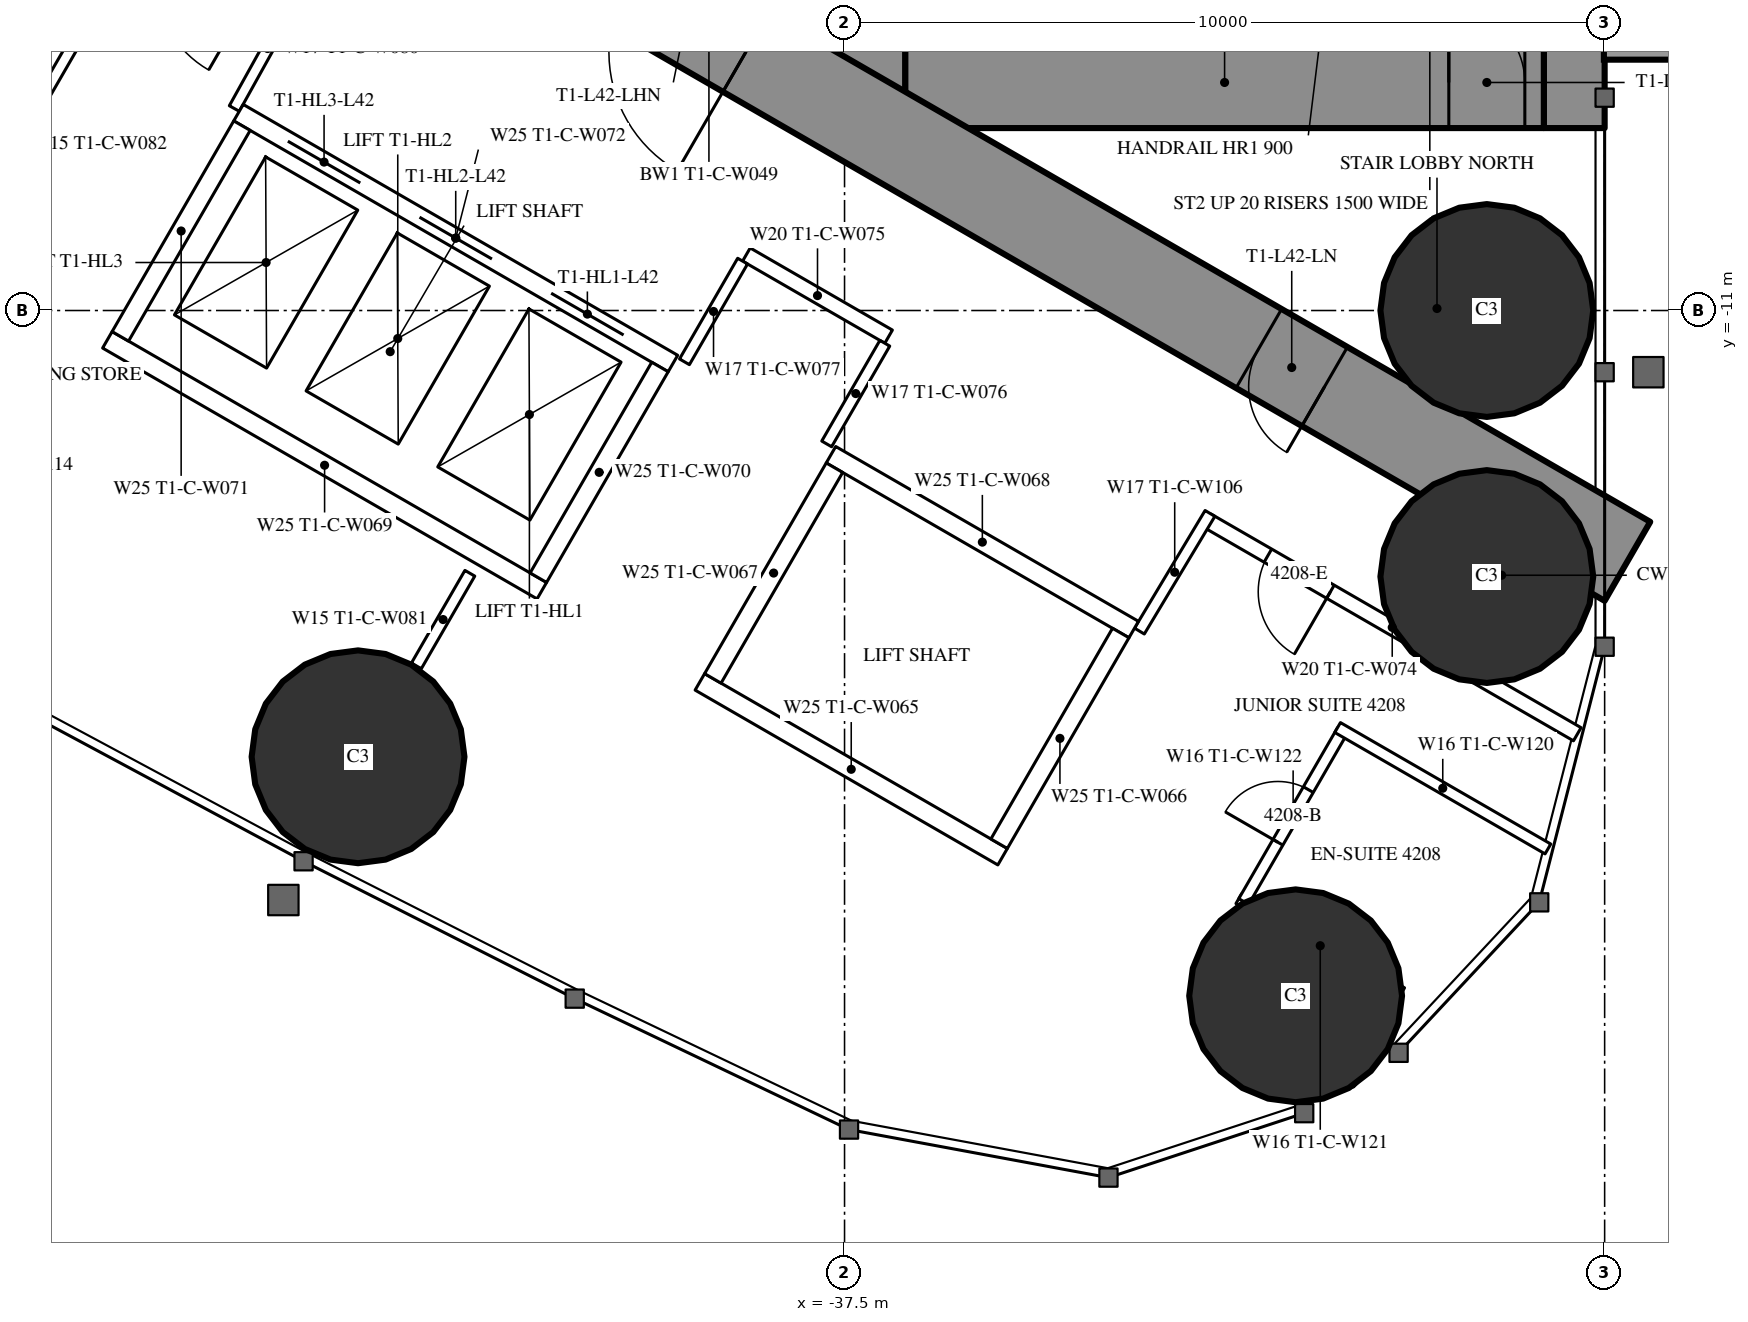
"""IFC4 building model, lengths in metres.
Left out: names, types, materials, properties, quantities, classifications, styles, units other than length and angle.
Written with IfcOpenShell. Run it as: python <this file> out.ifc"""

import sys

from ifc_helpers import new_model, si_unit, direction, frame, frame_2d, origin, origin_2d, place, context, subcontext, project, spatial, rectangle, circle, extrude, element, fill, save


model = new_model("IFC4")
c1 = context("Model", 3, precision=1e-05, world=origin(), true_north=direction((0.0, 1.0)))
c2 = subcontext(c1, "Body", "Model", "MODEL_VIEW")
j1 = project(units=[si_unit("LENGTHUNIT", "METRE"), si_unit("PLANEANGLEUNIT", "RADIAN")], contexts=[c1])
p1 = place(None, origin())
s1 = spatial("IfcSite", under=j1, at=p1, CompositionType="ELEMENT")
p2 = place(p1, origin())
s2 = spatial("IfcBuilding", under=s1, at=p2, CompositionType="ELEMENT")
p3 = place(p2, frame((0.0, 0.0, 159.8)))
s3 = spatial("IfcBuildingStorey", under=s2, at=p3, CompositionType="ELEMENT", Elevation=159.8)
for number, where, z_axis, x_axis in (
    (1, (-31.565, -20.016, 0.0), (0.0, 0.0, 1.0), (1.0, 0.0, 0.0)),
    (2, (-29.05, -11.0, 0.0), (0.0, 0.0, 1.0), (1.0, 0.0, 0.0)),
    (3, (-29.05, -14.5, 0.0), (0.0, 0.0, 1.0), (1.0, 0.0, 0.0)),
    (4, (-43.9, -16.871, 0.0), (0.0, 0.0, 1.0), (1.0, 0.0, 0.0)),
):
    element("IfcColumn", number, at=place(p3, frame(where, z_axis=z_axis, x_axis=x_axis)), inside=s3, PredefinedType="COLUMN", context=c2, shape_type="SweptSolid", body=[
        extrude(circle(Radius=1.4, at=origin_2d()), origin(), (0.0, 0.0, 1.0), 3.5),
    ])
p4 = place(p3, frame((-27.9, 8.6, 0.0), z_axis=(0.0, 0.0, 1.0), x_axis=(0.0, -1.0, 0.0)))
e5 = element("IfcWall", 5, at=p4, inside=s3, PredefinedType="SHEAR", context=c2, shape_type="SweptSolid", body=[
    extrude(rectangle(XDim=17.2, YDim=0.8, at=frame_2d((8.6, 0.0))), origin(), (0.0, 0.0, 1.0), 3.5),
])
p5 = place(p4, frame((2.45, 0.0, 0.6)))
e6 = element("IfcOpeningElement", 6, at=p5, cuts=e5, PredefinedType="OPENING", context=c2, shape_type="SweptSolid", body=[
    extrude(rectangle(XDim=0.6, YDim=2.1, at=frame_2d((0.3, 1.05))), frame((0.0, 0.41, 0.0), z_axis=(0.0, -1.0, 0.0), x_axis=(1.0, 0.0, 0.0)), (0.0, 0.0, 1.0), 0.82),
])
p6 = place(p4, frame((14.15, 0.0, 0.6)))
e7 = element("IfcOpeningElement", 7, at=p6, cuts=e5, PredefinedType="OPENING", context=c2, shape_type="SweptSolid", body=[
    extrude(rectangle(XDim=0.6, YDim=2.1, at=frame_2d((0.3, 1.05))), frame((0.0, 0.41, 0.0), z_axis=(0.0, -1.0, 0.0), x_axis=(1.0, 0.0, 0.0)), (0.0, 0.0, 1.0), 0.82),
])
p7 = place(p3, frame((-37.3, 8.6, 0.0), z_axis=(0.0, 0.0, 1.0), x_axis=(0.0, -1.0, 0.0)))
e8 = element("IfcWall", 8, at=p7, inside=s3, PredefinedType="SHEAR", context=c2, shape_type="SweptSolid", body=[
    extrude(rectangle(XDim=17.2, YDim=1.2, at=frame_2d((8.6, 0.0))), origin(), (0.0, 0.0, 1.0), 3.5),
])
p8 = place(p7, frame((7.7, 0.0, 0.0)))
e9 = element("IfcOpeningElement", 9, at=p8, cuts=e8, PredefinedType="OPENING", context=c2, shape_type="SweptSolid", body=[
    extrude(rectangle(XDim=1.8, YDim=2.2, at=frame_2d((0.9, 1.1))), frame((0.0, 0.61, 0.0), z_axis=(0.0, -1.0, 0.0), x_axis=(1.0, 0.0, 0.0)), (0.0, 0.0, 1.0), 1.22),
])
p9 = place(p3, frame((-28.3, -8.0, 0.0), z_axis=(0.0, 0.0, 1.0), x_axis=(-1.0, 0.0, 0.0)))
e10 = element("IfcWall", 10, at=p9, inside=s3, PredefinedType="SHEAR", context=c2, shape_type="SweptSolid", body=[
    extrude(rectangle(XDim=8.4, YDim=1.2, at=frame_2d((4.2, 0.0))), origin(), (0.0, 0.0, 1.0), 3.5),
])
p10 = place(p9, frame((0.25, 0.0, 0.0)))
e11 = element("IfcOpeningElement", 11, at=p10, cuts=e10, PredefinedType="OPENING", context=c2, shape_type="SweptSolid", body=[
    extrude(rectangle(XDim=1.0, YDim=2.2, at=frame_2d((0.5, 1.1))), frame((0.0, 0.61, 0.0), z_axis=(0.0, -1.0, 0.0), x_axis=(1.0, 0.0, 0.0)), (0.0, 0.0, 1.0), 1.22),
])
p11 = place(p3, frame((-27.2, -14.3, 0.0), z_axis=(0.0, 0.0, 1.0), x_axis=(-0.866024021859, 0.500002393557, 0.0)))
e12 = element("IfcWall", 12, at=p11, inside=s3, PredefinedType="SHEAR", context=c2, shape_type="SweptSolid", body=[
    extrude(rectangle(XDim=27.907, YDim=1.2, at=frame_2d((13.954, 0.0))), origin(), (0.0, 0.0, 1.0), 3.5),
])
p12 = place(p11, frame((4.6, 0.0, 0.0)))
e13 = element("IfcOpeningElement", 13, at=p12, cuts=e12, PredefinedType="OPENING", context=c2, shape_type="SweptSolid", body=[
    extrude(rectangle(XDim=1.0, YDim=2.2, at=frame_2d((0.5, 1.1))), frame((0.0, 0.61, 0.0), z_axis=(0.0, -1.0, 0.0), x_axis=(1.0, 0.0, 0.0)), (0.0, 0.0, 1.0), 1.22),
])
p13 = place(p11, frame((13.395, 0.0, 0.0)))
e14 = element("IfcOpeningElement", 14, at=p13, cuts=e12, PredefinedType="OPENING", context=c2, shape_type="SweptSolid", body=[
    extrude(rectangle(XDim=1.8, YDim=2.2, at=frame_2d((0.9, 1.1))), frame((0.0, 0.61, 0.0), z_axis=(0.0, -1.0, 0.0), x_axis=(1.0, 0.0, 0.0)), (0.0, 0.0, 1.0), 1.22),
])
p14 = place(p3, frame((-46.679, -5.825, 0.0), z_axis=(0.0, 0.0, 1.0), x_axis=(-0.500006839597, -0.866021454905, 0.0)))
e15 = element("IfcWall", 15, at=p14, inside=s3, PredefinedType="PARTITIONING", context=c2, shape_type="SweptSolid", body=[
    extrude(rectangle(XDim=6.911, YDim=0.15, at=frame_2d((3.456, 0.0))), origin(), (0.0, 0.0, 1.0), 2.3),
])
p15 = place(p3, frame((-42.429, -14.457, 0.0), z_axis=(0.0, 0.0, 1.0), x_axis=(-0.5000578829, -0.865991982497, 0.0)))
e16 = element("IfcWall", 16, at=p15, inside=s3, PredefinedType="PARTITIONING", context=c2, shape_type="SweptSolid", body=[
    extrude(rectangle(XDim=1.407, YDim=0.15, at=frame_2d((0.704, 0.0))), origin(), (0.0, 0.0, 1.0), 3.25),
])
p16 = place(p3, frame((-27.86, -16.575, 0.0), z_axis=(0.0, 0.0, 1.0), x_axis=(-0.866019269751, 0.500010624307, 0.0)))
e17 = element("IfcWall", 17, at=p16, inside=s3, PredefinedType="PARTITIONING", context=c2, shape_type="SweptSolid", body=[
    extrude(rectangle(XDim=5.623, YDim=0.2, at=frame_2d((2.811, 0.0))), origin(), (0.0, 0.0, 1.0), 3.25),
])
p17 = place(p16, frame((3.75, 0.0, 0.0)))
e18 = element("IfcOpeningElement", 18, at=p17, cuts=e17, PredefinedType="OPENING", context=c2, shape_type="SweptSolid", body=[
    extrude(rectangle(XDim=0.95, YDim=2.2, at=frame_2d((0.475, 1.1))), frame((0.0, 0.11, 0.0), z_axis=(0.0, -1.0, 0.0), x_axis=(1.0, 0.0, 0.0)), (0.0, 0.0, 1.0), 0.22),
])
p18 = place(p3, frame((-36.92, -11.344, 0.0), z_axis=(0.0, 0.0, 1.0), x_axis=(-0.866065156741, 0.499931139538, 0.0)))
e19 = element("IfcWall", 19, at=p18, inside=s3, PredefinedType="PARTITIONING", context=c2, shape_type="SweptSolid", body=[
    extrude(rectangle(XDim=2.16, YDim=0.2, at=frame_2d((1.08, 0.0))), origin(), (0.0, 0.0, 1.0), 3.25),
])
for number, where, z_axis, x_axis in (
    (20, (-33.621, -15.218, 0.0), (0.0, 0.0, 1.0), (0.514, 0.858, 0.0)),
    (21, (-44.652, -6.764, 0.0), (0.0, 0.0, 1.0), (-0.485, -0.874, 0.0)),
):
    element("IfcWall", number, at=place(p3, frame(where, z_axis=z_axis, x_axis=x_axis)), inside=s3, PredefinedType="PARTITIONING", context=c2, shape_type="SweptSolid", body=[
        extrude(rectangle(XDim=1.805, YDim=0.15, at=frame_2d((0.903, 0.0))), origin(), (0.0, 0.0, 1.0), 3.25),
    ])
p19 = place(p3, frame((-36.97, -11.43, 0.0), z_axis=(0.0, 0.0, 1.0), x_axis=(-0.499985008713, -0.866034058835, 0.0)))
e22 = element("IfcWall", 22, at=p19, inside=s3, PredefinedType="PARTITIONING", context=c2, shape_type="SweptSolid", body=[
    extrude(rectangle(XDim=1.529, YDim=0.15, at=frame_2d((0.765, 0.0))), origin(), (0.0, 0.0, 1.0), 3.25),
])
p20 = place(p3, frame((-38.841, -10.35, 0.0), z_axis=(0.0, 0.0, 1.0), x_axis=(-0.499966498333, -0.866044745117, 0.0)))
e23 = element("IfcWall", 23, at=p20, inside=s3, PredefinedType="PARTITIONING", context=c2, shape_type="SweptSolid", body=[
    extrude(rectangle(XDim=1.53, YDim=0.15, at=frame_2d((0.765, 0.0))), origin(), (0.0, 0.0, 1.0), 3.25),
])
p21 = place(p3, frame((-30.17, -19.975, 0.0), z_axis=(0.0, 0.0, 1.0), x_axis=(-0.866006523861, 0.500032699561, 0.0)))
e24 = element("IfcWall", 24, at=p21, inside=s3, PredefinedType="PARTITIONING", context=c2, shape_type="SweptSolid", body=[
    extrude(rectangle(XDim=2.475, YDim=0.15, at=frame_2d((1.237, 0.0))), origin(), (0.0, 0.0, 1.0), 3.25),
])
p22 = place(p3, frame((-30.948, -16.524, 0.0), z_axis=(0.0, 0.0, 1.0), x_axis=(-0.500006934395, -0.866021400173, 0.0)))
e25 = element("IfcWall", 25, at=p22, inside=s3, PredefinedType="PARTITIONING", context=c2, shape_type="SweptSolid", body=[
    extrude(rectangle(XDim=2.6, YDim=0.15, at=frame_2d((1.3, 0.0))), origin(), (0.0, 0.0, 1.0), 2.3),
])
p23 = place(p22, frame((0.9, 0.0, 0.0)))
e26 = element("IfcOpeningElement", 26, at=p23, cuts=e25, PredefinedType="OPENING", context=c2, shape_type="SweptSolid", body=[
    extrude(rectangle(XDim=0.8, YDim=2.2, at=frame_2d((0.4, 1.1))), frame((0.0, 0.085, 0.0), z_axis=(0.0, -1.0, 0.0), x_axis=(1.0, 0.0, 0.0)), (0.0, 0.0, 1.0), 0.17),
])
p24 = place(p3, frame((-28.246, -18.084, 0.0), z_axis=(0.0, 0.0, 1.0), x_axis=(-0.866029063467, 0.49999366119, 0.0)))
e27 = element("IfcWall", 27, at=p24, inside=s3, PredefinedType="PARTITIONING", context=c2, shape_type="SweptSolid", body=[
    extrude(rectangle(XDim=3.195, YDim=0.15, at=frame_2d((1.597, 0.0))), origin(), (0.0, 0.0, 1.0), 2.45),
])
p25 = place(p3, frame((-33.696, -15.197, 0.0), z_axis=(0.0, 0.0, 1.0), x_axis=(-0.865976953817, 0.500083908417, 0.0)))
e28 = element("IfcWall", 28, at=p25, inside=s3, PredefinedType="PARTITIONING", context=c2, shape_type="SweptSolid", body=[
    extrude(rectangle(XDim=4.599, YDim=0.25, at=frame_2d((2.3, 0.0))), origin(), (0.0, 0.0, 1.0), 3.25),
])
p26 = place(p3, frame((-35.42, -18.186, 0.0), z_axis=(0.0, 0.0, 1.0), x_axis=(-0.865990227814, 0.50006092162, 0.0)))
e29 = element("IfcWall", 29, at=p26, inside=s3, PredefinedType="PARTITIONING", context=c2, shape_type="SweptSolid", body=[
    extrude(rectangle(XDim=4.6, YDim=0.25, at=frame_2d((2.3, 0.0))), origin(), (0.0, 0.0, 1.0), 3.25),
])
p27 = place(p3, frame((-33.866, -15.243, 0.0), z_axis=(0.0, 0.0, 1.0), x_axis=(-0.499929347863, -0.866066190972, 0.0)))
e30 = element("IfcWall", 30, at=p27, inside=s3, PredefinedType="PARTITIONING", context=c2, shape_type="SweptSolid", body=[
    extrude(rectangle(XDim=3.201, YDim=0.25, at=frame_2d((1.6, 0.0))), origin(), (0.0, 0.0, 1.0), 3.25),
])
p28 = place(p3, frame((-37.633, -13.068, 0.0), z_axis=(0.0, 0.0, 1.0), x_axis=(-0.499872130319, -0.866099216793, 0.0)))
e31 = element("IfcWall", 31, at=p28, inside=s3, PredefinedType="PARTITIONING", context=c2, shape_type="SweptSolid", body=[
    extrude(rectangle(XDim=3.2, YDim=0.25, at=frame_2d((1.6, 0.0))), origin(), (0.0, 0.0, 1.0), 3.25),
])
p29 = place(p3, frame((-39.758, -11.697, 0.0), z_axis=(0.0, 0.0, 1.0), x_axis=(-0.866024194504, 0.500002094529, 0.0)))
e32 = element("IfcWall", 32, at=p29, inside=s3, PredefinedType="PARTITIONING", context=c2, shape_type="SweptSolid", body=[
    extrude(rectangle(XDim=6.6, YDim=0.25, at=frame_2d((3.3, 0.0))), origin(), (0.0, 0.0, 1.0), 3.25),
])
p30 = place(p29, frame((0.75, 0.0, 0.0)))
e33 = element("IfcOpeningElement", 33, at=p30, cuts=e32, PredefinedType="OPENING", context=c2, shape_type="SweptSolid", body=[
    extrude(rectangle(XDim=1.1, YDim=2.2, at=frame_2d((0.55, 1.1))), frame((0.0, 0.135, 0.0), z_axis=(0.0, -1.0, 0.0), x_axis=(1.0, 0.0, 0.0)), (0.0, 0.0, 1.0), 0.27),
])
p31 = place(p29, frame((2.75, 0.0, 0.0)))
e34 = element("IfcOpeningElement", 34, at=p31, cuts=e32, PredefinedType="OPENING", context=c2, shape_type="SweptSolid", body=[
    extrude(rectangle(XDim=1.1, YDim=2.2, at=frame_2d((0.55, 1.1))), frame((0.0, 0.135, 0.0), z_axis=(0.0, -1.0, 0.0), x_axis=(1.0, 0.0, 0.0)), (0.0, 0.0, 1.0), 0.27),
])
p32 = place(p29, frame((4.75, 0.0, 0.0)))
e35 = element("IfcOpeningElement", 35, at=p32, cuts=e32, PredefinedType="OPENING", context=c2, shape_type="SweptSolid", body=[
    extrude(rectangle(XDim=1.1, YDim=2.2, at=frame_2d((0.55, 1.1))), frame((0.0, 0.135, 0.0), z_axis=(0.0, -1.0, 0.0), x_axis=(1.0, 0.0, 0.0)), (0.0, 0.0, 1.0), 0.27),
])
p33 = place(p3, frame((-41.482, -14.686, 0.0), z_axis=(0.0, 0.0, 1.0), x_axis=(-0.86603344179, 0.499986077507, 0.0)))
e36 = element("IfcWall", 36, at=p33, inside=s3, PredefinedType="PARTITIONING", context=c2, shape_type="SweptSolid", body=[
    extrude(rectangle(XDim=6.6, YDim=0.25, at=frame_2d((3.3, 0.0))), origin(), (0.0, 0.0, 1.0), 3.25),
])
for number, where, z_axis, x_axis in (
    (37, (-39.928, -11.743, 0.0), (0.0, 0.0, 1.0), (-0.5, -0.866, 0.0)),
    (38, (-45.428, -8.568, 0.0), (0.0, 0.0, 1.0), (-0.5, -0.866, 0.0)),
):
    element("IfcWall", number, at=place(p3, frame(where, z_axis=z_axis, x_axis=x_axis)), inside=s3, PredefinedType="PARTITIONING", context=c2, shape_type="SweptSolid", body=[
        extrude(rectangle(XDim=3.201, YDim=0.25, at=frame_2d((1.6, 0.0))), origin(), (0.0, 0.0, 1.0), 3.25),
    ])
p34 = place(p23, origin())
e39 = element("IfcDoor", 39, at=p34, inside=s3, OperationType="SINGLE_SWING_RIGHT", PredefinedType="DOOR", context=c2, shape_type="SweptSolid", body=[
    extrude(rectangle(XDim=0.8, YDim=2.2, at=frame_2d((0.4, 1.1))), frame((0.0, 0.025, 0.0), z_axis=(0.0, -1.0, 0.0), x_axis=(1.0, 0.0, 0.0)), (0.0, 0.0, 1.0), 0.05),
])
fill(e26, e39)
p35 = place(p17, origin())
e40 = element("IfcDoor", 40, at=p35, inside=s3, OperationType="SINGLE_SWING_LEFT", PredefinedType="DOOR", context=c2, shape_type="SweptSolid", body=[
    extrude(rectangle(XDim=0.95, YDim=2.2, at=frame_2d((0.475, 1.1))), frame((0.0, 0.025, 0.0), z_axis=(0.0, -1.0, 0.0), x_axis=(1.0, 0.0, 0.0)), (0.0, 0.0, 1.0), 0.05),
])
fill(e18, e40)
p36 = place(p12, origin())
e41 = element("IfcDoor", 41, at=p36, inside=s3, OperationType="SINGLE_SWING_LEFT", PredefinedType="DOOR", context=c2, shape_type="SweptSolid", body=[
    extrude(rectangle(XDim=1.0, YDim=2.2, at=frame_2d((0.5, 1.1))), frame((0.0, 0.025, 0.0), z_axis=(0.0, -1.0, 0.0), x_axis=(1.0, 0.0, 0.0)), (0.0, 0.0, 1.0), 0.05),
])
fill(e13, e41)
p37 = place(p13, origin())
e42 = element("IfcDoor", 42, at=p37, inside=s3, OperationType="DOUBLE_DOOR_SINGLE_SWING", PredefinedType="DOOR", context=c2, shape_type="SweptSolid", body=[
    extrude(rectangle(XDim=1.8, YDim=2.2, at=frame_2d((0.9, 1.1))), frame((0.0, 0.025, 0.0), z_axis=(0.0, -1.0, 0.0), x_axis=(1.0, 0.0, 0.0)), (0.0, 0.0, 1.0), 0.05),
])
fill(e14, e42)
p38 = place(p10, origin())
e43 = element("IfcDoor", 43, at=p38, inside=s3, OperationType="SINGLE_SWING_RIGHT", PredefinedType="DOOR", context=c2, shape_type="SweptSolid", body=[
    extrude(rectangle(XDim=1.0, YDim=2.2, at=frame_2d((0.5, 1.1))), frame((0.0, 0.025, 0.0), z_axis=(0.0, -1.0, 0.0), x_axis=(1.0, 0.0, 0.0)), (0.0, 0.0, 1.0), 0.05),
])
fill(e11, e43)
p39 = place(p30, origin())
e44 = element("IfcDoor", 44, at=p39, inside=s3, OperationType="DOUBLE_DOOR_SLIDING", PredefinedType="USERDEFINED", context=c2, shape_type="SweptSolid", body=[
    extrude(rectangle(XDim=1.1, YDim=2.2, at=frame_2d((0.55, 1.1))), frame((0.0, 0.025, 0.0), z_axis=(0.0, -1.0, 0.0), x_axis=(1.0, 0.0, 0.0)), (0.0, 0.0, 1.0), 0.05),
])
fill(e33, e44)
p40 = place(p31, origin())
e45 = element("IfcDoor", 45, at=p40, inside=s3, OperationType="DOUBLE_DOOR_SLIDING", PredefinedType="USERDEFINED", context=c2, shape_type="SweptSolid", body=[
    extrude(rectangle(XDim=1.1, YDim=2.2, at=frame_2d((0.55, 1.1))), frame((0.0, 0.025, 0.0), z_axis=(0.0, -1.0, 0.0), x_axis=(1.0, 0.0, 0.0)), (0.0, 0.0, 1.0), 0.05),
])
fill(e34, e45)
p41 = place(p32, origin())
e46 = element("IfcDoor", 46, at=p41, inside=s3, OperationType="DOUBLE_DOOR_SLIDING", PredefinedType="USERDEFINED", context=c2, shape_type="SweptSolid", body=[
    extrude(rectangle(XDim=1.1, YDim=2.2, at=frame_2d((0.55, 1.1))), frame((0.0, 0.025, 0.0), z_axis=(0.0, -1.0, 0.0), x_axis=(1.0, 0.0, 0.0)), (0.0, 0.0, 1.0), 0.05),
])
fill(e35, e46)
save(model, sys.argv[1])
